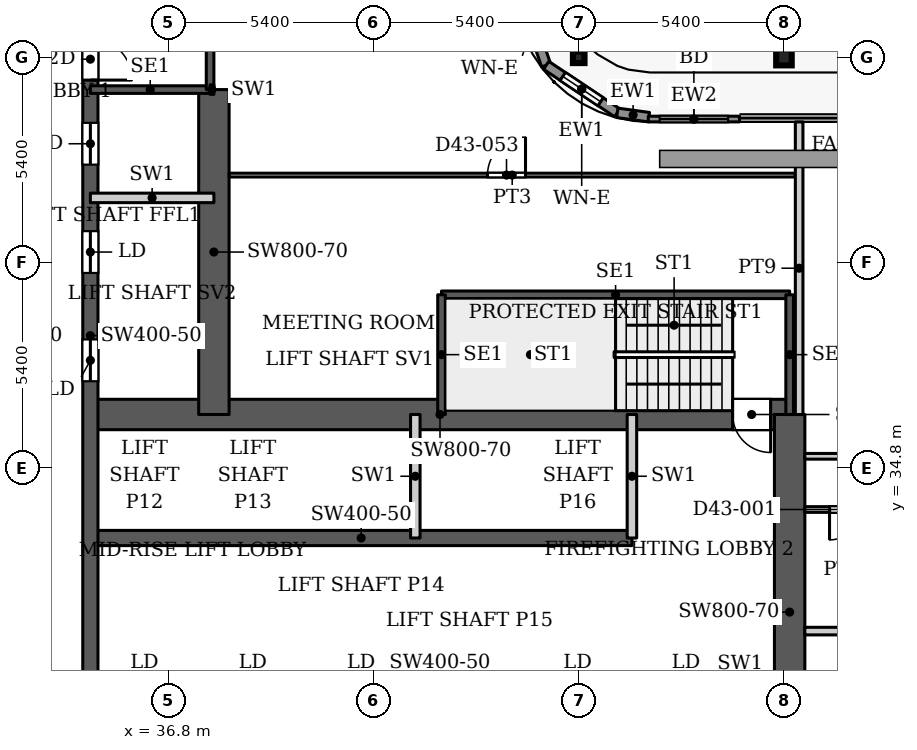
"""IFC4 building model, lengths in metres.
Left out: names, types, materials, properties, quantities, classifications, styles, units other than length and angle.
Written with IfcOpenShell. Run it as: python <this file> out.ifc"""

import sys

from ifc_helpers import new_model, si_unit, direction, frame, frame_2d, origin, origin_2d, place, context, subcontext, project, spatial, rectangle, hollow_rectangle, i_section, extrude, source, transform, mapped, element, fill, save


model = new_model("IFC4")
c1 = context("Model", 3, precision=1e-05, world=origin(), true_north=direction((0.0, 1.0)))
c2 = subcontext(c1, "Body", "Model", "MODEL_VIEW")
j1 = project(units=[si_unit("LENGTHUNIT", "METRE"), si_unit("PLANEANGLEUNIT", "RADIAN")], contexts=[c1])
p1 = place(None, origin())
s1 = spatial("IfcSite", under=j1, at=p1, CompositionType="ELEMENT")
p2 = place(p1, origin())
s2 = spatial("IfcBuilding", under=s1, at=p2, CompositionType="ELEMENT")
p3 = place(p2, frame((0.0, 0.0, 183.8)))
s3 = spatial("IfcBuildingStorey", under=s2, at=p3, CompositionType="ELEMENT", Elevation=183.8)
p4 = place(p3, frame((53.0, 45.6, 0.0), z_axis=(0.0, 0.0, 1.0), x_axis=(1.0, 0.0, 0.0)))
e1 = element("IfcColumn", 1, at=p4, inside=s3, PredefinedType="COLUMN", context=c2, shape_type="SweptSolid", body=[
    extrude(i_section(OverallWidth=0.409, OverallDepth=0.425, WebThickness=0.033, FlangeThickness=0.052, FilletRadius=0.013, at=origin_2d()), origin(), (0.0, 0.0, 1.0), 3.9),
])
p5 = place(p3, frame((47.6, 45.6, 0.0), z_axis=(0.0, 0.0, 1.0), x_axis=(1.0, 0.0, 0.0)))
e2 = element("IfcColumn", 2, at=p5, inside=s3, PredefinedType="COLUMN", context=c2, shape_type="SweptSolid", body=[
    extrude(hollow_rectangle(XDim=0.305, YDim=0.305, WallThickness=0.016, InnerFilletRadius=0.016, OuterFilletRadius=0.032, at=origin_2d()), origin(), (0.0, 0.0, 1.0), 3.9),
])
p6 = place(p3, frame((34.75, 32.95, 0.0), z_axis=(0.0, 0.0, 1.0), x_axis=(1.0, 0.0, 0.0)))
e3 = element("IfcWall", 3, at=p6, inside=s3, PredefinedType="SHEAR", context=c2, shape_type="SweptSolid", body=[
    extrude(rectangle(XDim=14.25, YDim=0.4, at=frame_2d((7.125, 0.0))), origin(), (0.0, 0.0, 1.0), 3.9),
])
p7 = place(p3, frame((34.75, 36.2, 0.0), z_axis=(0.0, 0.0, 1.0), x_axis=(1.0, 0.0, 0.0)))
e4 = element("IfcWall", 4, at=p7, inside=s3, PredefinedType="SHEAR", context=c2, shape_type="SweptSolid", body=[
    extrude(rectangle(XDim=18.4, YDim=0.8, at=frame_2d((9.2, 0.0))), origin(), (0.0, 0.0, 1.0), 3.9),
])
p8 = place(p7, frame((16.9, 0.0, 0.0)))
e5 = element("IfcOpeningElement", 5, at=p8, cuts=e4, PredefinedType="OPENING", context=c2, shape_type="SweptSolid", body=[
    extrude(rectangle(XDim=1.0, YDim=2.2, at=frame_2d((0.5, 1.1))), frame((0.0, 0.41, 0.0), z_axis=(0.0, -1.0, 0.0), x_axis=(1.0, 0.0, 0.0)), (0.0, 0.0, 1.0), 0.82),
])
p9 = place(p3, frame((34.75, 29.05, 0.0), z_axis=(0.0, 0.0, 1.0), x_axis=(0.0, 1.0, 0.0)))
e6 = element("IfcWall", 6, at=p9, inside=s3, PredefinedType="SHEAR", context=c2, shape_type="SweptSolid", body=[
    extrude(rectangle(XDim=18.45, YDim=0.4, at=frame_2d((9.225, 0.0))), origin(), (0.0, 0.0, 1.0), 3.9),
])
p10 = place(p9, frame((8.025, 0.0, 0.0)))
e7 = element("IfcOpeningElement", 7, at=p10, cuts=e6, PredefinedType="OPENING", context=c2, shape_type="SweptSolid", body=[
    extrude(rectangle(XDim=1.1, YDim=2.2, at=frame_2d((0.55, 1.1))), frame((0.0, 0.21, 0.0), z_axis=(0.0, -1.0, 0.0), x_axis=(1.0, 0.0, 0.0)), (0.0, 0.0, 1.0), 0.42),
])
p11 = place(p9, frame((10.875, 0.0, 0.0)))
e8 = element("IfcOpeningElement", 8, at=p11, cuts=e6, PredefinedType="OPENING", context=c2, shape_type="SweptSolid", body=[
    extrude(rectangle(XDim=1.1, YDim=2.2, at=frame_2d((0.55, 1.1))), frame((0.0, 0.21, 0.0), z_axis=(0.0, -1.0, 0.0), x_axis=(1.0, 0.0, 0.0)), (0.0, 0.0, 1.0), 0.42),
])
p12 = place(p9, frame((13.725, 0.0, 0.0)))
e9 = element("IfcOpeningElement", 9, at=p12, cuts=e6, PredefinedType="OPENING", context=c2, shape_type="SweptSolid", body=[
    extrude(rectangle(XDim=1.1, YDim=2.2, at=frame_2d((0.55, 1.1))), frame((0.0, 0.21, 0.0), z_axis=(0.0, -1.0, 0.0), x_axis=(1.0, 0.0, 0.0)), (0.0, 0.0, 1.0), 0.42),
])
p13 = place(p9, frame((15.95, 0.0, 0.0)))
e10 = element("IfcOpeningElement", 10, at=p13, cuts=e6, PredefinedType="OPENING", context=c2, shape_type="SweptSolid", body=[
    extrude(rectangle(XDim=1.1, YDim=2.2, at=frame_2d((0.55, 1.1))), frame((0.0, 0.21, 0.0), z_axis=(0.0, -1.0, 0.0), x_axis=(1.0, 0.0, 0.0)), (0.0, 0.0, 1.0), 0.42),
])
p14 = place(p3, frame((38.0, 36.2, 0.0), z_axis=(0.0, 0.0, 1.0), x_axis=(0.0, 1.0, 0.0)))
e11 = element("IfcWall", 11, at=p14, inside=s3, PredefinedType="SHEAR", context=c2, shape_type="SweptSolid", body=[
    extrude(rectangle(XDim=8.55, YDim=0.8, at=frame_2d((4.275, 0.0))), origin(), (0.0, 0.0, 1.0), 3.9),
])
p15 = place(p3, frame((53.15, 25.8, 0.0), z_axis=(0.0, 0.0, 1.0), x_axis=(0.0, 1.0, 0.0)))
e12 = element("IfcWall", 12, at=p15, inside=s3, PredefinedType="SHEAR", context=c2, shape_type="SweptSolid", body=[
    extrude(rectangle(XDim=10.4, YDim=0.8, at=frame_2d((5.2, 0.0))), origin(), (0.0, 0.0, 1.0), 3.9),
])
p16 = place(p3, frame((46.018, 47.471, 0.0), z_axis=(0.0, 0.0, 1.0), x_axis=(0.328791208903, -0.944402637093, 0.0)))
e13 = element("IfcWall", 13, at=p16, inside=s3, PredefinedType="SOLIDWALL", context=c2, shape_type="SweptSolid", body=[
    extrude(rectangle(XDim=2.205, YDim=0.25, at=frame_2d((1.102, 0.0))), origin(), (0.0, 0.0, 1.0), 3.75),
])
p17 = place(p16, frame((0.503, 0.0, 0.6)))
e14 = element("IfcOpeningElement", 14, at=p17, cuts=e13, PredefinedType="OPENING", context=c2, shape_type="SweptSolid", body=[
    extrude(rectangle(XDim=1.2, YDim=2.1, at=frame_2d((0.6, 1.05))), frame((0.0, 0.135, 0.0), z_axis=(0.0, -1.0, 0.0), x_axis=(1.0, 0.0, 0.0)), (0.0, 0.0, 1.0), 0.27),
])
p18 = place(p3, frame((46.743, 45.389, 0.0), z_axis=(0.0, 0.0, 1.0), x_axis=(0.831449265529, -0.555600682912, 0.0)))
e15 = element("IfcWall", 15, at=p18, inside=s3, PredefinedType="SOLIDWALL", context=c2, shape_type="SweptSolid", body=[
    extrude(rectangle(XDim=2.251, YDim=0.25, at=frame_2d((1.126, 0.0))), origin(), (0.0, 0.0, 1.0), 3.75),
])
p19 = place(p18, frame((0.525, 0.0, 0.6)))
e16 = element("IfcOpeningElement", 16, at=p19, cuts=e15, PredefinedType="OPENING", context=c2, shape_type="SweptSolid", body=[
    extrude(rectangle(XDim=1.2, YDim=2.1, at=frame_2d((0.6, 1.05))), frame((0.0, 0.135, 0.0), z_axis=(0.0, -1.0, 0.0), x_axis=(1.0, 0.0, 0.0)), (0.0, 0.0, 1.0), 0.27),
])
p20 = place(p3, frame((48.615, 44.138, 0.0), z_axis=(0.0, 0.0, 1.0), x_axis=(0.990741504246, -0.135761819977, 0.0)))
e17 = element("IfcWall", 17, at=p20, inside=s3, PredefinedType="SOLIDWALL", context=c2, shape_type="SweptSolid", body=[
    extrude(rectangle(XDim=0.84, YDim=0.25, at=frame_2d((0.42, 0.0))), origin(), (0.0, 0.0, 1.0), 3.75),
])
p21 = place(p3, frame((49.43, 43.975, 0.0), z_axis=(0.0, 0.0, 1.0), x_axis=(1.0, 0.0, 0.0)))
e18 = element("IfcWall", 18, at=p21, inside=s3, PredefinedType="SOLIDWALL", context=c2, shape_type="SweptSolid", body=[
    extrude(rectangle(XDim=2.4, YDim=0.15, at=frame_2d((1.2, 0.0))), origin(), (0.0, 0.0, 1.0), 3.75),
])
p22 = place(p21, frame((0.3, 0.0, 0.0)))
e19 = element("IfcOpeningElement", 19, at=p22, cuts=e18, PredefinedType="OPENING", context=c2, shape_type="SweptSolid", body=[
    extrude(rectangle(XDim=1.8, YDim=2.4, at=frame_2d((0.9, 1.2))), frame((0.0, 0.085, 0.0), z_axis=(0.0, -1.0, 0.0), x_axis=(1.0, 0.0, 0.0)), (0.0, 0.0, 1.0), 0.17),
])
p23 = place(p3, frame((43.99, 39.35, 0.0), z_axis=(0.0, 0.0, 1.0), x_axis=(1.0, 0.0, 0.0)))
e20 = element("IfcWall", 20, at=p23, inside=s3, PredefinedType="SHEAR", context=c2, shape_type="SweptSolid", body=[
    extrude(rectangle(XDim=9.16, YDim=0.2, at=frame_2d((4.58, 0.0))), origin(), (0.0, 0.0, 1.0), 3.9),
])
for number, where, z_axis, x_axis in (
    (21, (43.99, 36.2, 0.0), (0.0, 0.0, 1.0), (0.0, 1.0, 0.0)),
    (22, (53.15, 36.2, 0.0), (0.0, 0.0, 1.0), (0.0, 1.0, 0.0)),
):
    element("IfcWall", number, at=place(p3, frame(where, z_axis=z_axis, x_axis=x_axis)), inside=s3, PredefinedType="SHEAR", context=c2, shape_type="SweptSolid", body=[
        extrude(rectangle(XDim=3.15, YDim=0.2, at=frame_2d((1.575, 0.0))), origin(), (0.0, 0.0, 1.0), 3.9),
    ])
p24 = place(p3, frame((34.75, 44.75, 0.0), z_axis=(0.0, 0.0, 1.0), x_axis=(1.0, 0.0, 0.0)))
e23 = element("IfcWall", 23, at=p24, inside=s3, PredefinedType="SHEAR", context=c2, shape_type="SweptSolid", body=[
    extrude(rectangle(XDim=3.15, YDim=0.2, at=frame_2d((1.575, 0.0))), origin(), (0.0, 0.0, 1.0), 3.9),
])
p25 = place(p3, frame((37.9, 44.75, 0.0), z_axis=(0.0, 0.0, 1.0), x_axis=(0.0, 1.0, 0.0)))
e24 = element("IfcWall", 24, at=p25, inside=s3, PredefinedType="SHEAR", context=c2, shape_type="SweptSolid", body=[
    extrude(rectangle(XDim=9.16, YDim=0.2, at=frame_2d((4.58, 0.0))), origin(), (0.0, 0.0, 1.0), 3.9),
])
for number, where, z_axis, x_axis in (
    (25, (43.3, 32.95, 0.0), (0.0, 0.0, 1.0), (0.0, 1.0, 0.0)),
    (26, (49.0, 32.95, 0.0), (0.0, 0.0, 1.0), (0.0, 1.0, 0.0)),
    (27, (34.75, 41.9, 0.0), (0.0, 0.0, 1.0), (1.0, 0.0, 0.0)),
):
    element("IfcWall", number, at=place(p3, frame(where, z_axis=z_axis, x_axis=x_axis)), inside=s3, PredefinedType="PARTITIONING", context=c2, shape_type="SweptSolid", body=[
        extrude(rectangle(XDim=3.25, YDim=0.25, at=frame_2d((1.625, 0.0))), origin(), (0.0, 0.0, 1.0), 3.9),
    ])
p26 = place(p3, frame((37.9, 44.75, 0.0), z_axis=(0.0, 0.0, 1.0), x_axis=(1.0, 0.0, 0.0)))
e28 = element("IfcWall", 28, at=p26, inside=s3, PredefinedType="PARTITIONING", context=c2, shape_type="SweptSolid", body=[
    extrude(rectangle(XDim=0.1, YDim=0.25, at=frame_2d((0.05, 0.0))), origin(), (0.0, 0.0, 1.0), 3.9),
])
p27 = place(p3, frame((38.399, 42.5, 0.0), z_axis=(0.0, 0.0, 1.0), x_axis=(1.0, 0.0, 0.0)))
e29 = element("IfcWall", 29, at=p27, inside=s3, PredefinedType="PARTITIONING", context=c2, shape_type="SweptSolid", body=[
    extrude(rectangle(XDim=14.901, YDim=0.1, at=frame_2d((7.451, 0.0))), origin(), (0.0, 0.0, 1.0), 3.6),
])
p28 = place(p27, frame((6.801, 0.0, 0.0)))
e30 = element("IfcOpeningElement", 30, at=p28, cuts=e29, PredefinedType="OPENING", context=c2, shape_type="SweptSolid", body=[
    extrude(rectangle(XDim=1.0, YDim=2.1, at=frame_2d((0.5, 1.05))), frame((0.0, 0.06, 0.0), z_axis=(0.0, -1.0, 0.0), x_axis=(1.0, 0.0, 0.0)), (0.0, 0.0, 1.0), 0.12),
])
p29 = place(p3, frame((53.4, 36.199, 0.0), z_axis=(0.0, 0.0, 1.0), x_axis=(0.0, 1.0, 0.0)))
e31 = element("IfcWall", 31, at=p29, inside=s3, PredefinedType="PARTITIONING", context=c2, shape_type="SweptSolid", body=[
    extrude(rectangle(XDim=7.701, YDim=0.2, at=frame_2d((3.851, 0.0))), origin(), (0.0, 0.0, 1.0), 3.6),
])
p30 = place(p3, frame((53.549, 30.5, 0.0), z_axis=(0.0, 0.0, 1.0), x_axis=(1.0, 0.0, 0.0)))
e32 = element("IfcWall", 32, at=p30, inside=s3, PredefinedType="PARTITIONING", context=c2, shape_type="SweptSolid", body=[
    extrude(rectangle(XDim=44.551, YDim=0.2, at=frame_2d((22.275, 0.0))), origin(), (0.0, 0.0, 1.0), 3.6),
])
p31 = place(p30, frame((8.351, 0.0, 0.0)))
e33 = element("IfcOpeningElement", 33, at=p31, cuts=e32, PredefinedType="OPENING", context=c2, shape_type="SweptSolid", body=[
    extrude(rectangle(XDim=1.0, YDim=2.1, at=frame_2d((0.5, 1.05))), frame((0.0, 0.11, 0.0), z_axis=(0.0, -1.0, 0.0), x_axis=(1.0, 0.0, 0.0)), (0.0, 0.0, 1.0), 0.22),
])
p32 = place(p30, frame((12.551, 0.0, 0.0)))
e34 = element("IfcOpeningElement", 34, at=p32, cuts=e32, PredefinedType="OPENING", context=c2, shape_type="SweptSolid", body=[
    extrude(rectangle(XDim=1.0, YDim=2.1, at=frame_2d((0.5, 1.05))), frame((0.0, 0.11, 0.0), z_axis=(0.0, -1.0, 0.0), x_axis=(1.0, 0.0, 0.0)), (0.0, 0.0, 1.0), 0.22),
])
p33 = place(p30, frame((28.751, 0.0, 0.0)))
e35 = element("IfcOpeningElement", 35, at=p33, cuts=e32, PredefinedType="OPENING", context=c2, shape_type="SweptSolid", body=[
    extrude(rectangle(XDim=1.0, YDim=2.1, at=frame_2d((0.5, 1.05))), frame((0.0, 0.11, 0.0), z_axis=(0.0, -1.0, 0.0), x_axis=(1.0, 0.0, 0.0)), (0.0, 0.0, 1.0), 0.22),
])
p34 = place(p30, frame((40.751, 0.0, 0.0)))
e36 = element("IfcOpeningElement", 36, at=p34, cuts=e32, PredefinedType="OPENING", context=c2, shape_type="SweptSolid", body=[
    extrude(rectangle(XDim=1.0, YDim=2.1, at=frame_2d((0.5, 1.05))), frame((0.0, 0.11, 0.0), z_axis=(0.0, -1.0, 0.0), x_axis=(1.0, 0.0, 0.0)), (0.0, 0.0, 1.0), 0.22),
])
p35 = place(p3, frame((53.549, 33.7, 0.0), z_axis=(0.0, 0.0, 1.0), x_axis=(1.0, 0.0, 0.0)))
e37 = element("IfcWall", 37, at=p35, inside=s3, PredefinedType="PARTITIONING", context=c2, shape_type="SweptSolid", body=[
    extrude(rectangle(XDim=7.701, YDim=0.15, at=frame_2d((3.851, 0.0))), origin(), (0.0, 0.0, 1.0), 3.6),
])
p36 = place(p35, frame((0.651, 0.0, 0.0)))
e38 = element("IfcOpeningElement", 38, at=p36, cuts=e37, PredefinedType="OPENING", context=c2, shape_type="SweptSolid", body=[
    extrude(rectangle(XDim=0.8, YDim=2.1, at=frame_2d((0.4, 1.05))), frame((0.0, 0.085, 0.0), z_axis=(0.0, -1.0, 0.0), x_axis=(1.0, 0.0, 0.0)), (0.0, 0.0, 1.0), 0.17),
])
p37 = place(p35, frame((5.401, 0.0, 0.0)))
e39 = element("IfcOpeningElement", 39, at=p37, cuts=e37, PredefinedType="OPENING", context=c2, shape_type="SweptSolid", body=[
    extrude(rectangle(XDim=0.9, YDim=2.1, at=frame_2d((0.45, 1.05))), frame((0.0, 0.085, 0.0), z_axis=(0.0, -1.0, 0.0), x_axis=(1.0, 0.0, 0.0)), (0.0, 0.0, 1.0), 0.17),
])
p38 = place(p35, frame((2.751, 0.0, 0.0)))
e40 = element("IfcOpeningElement", 40, at=p38, cuts=e37, PredefinedType="OPENING", context=c2, shape_type="SweptSolid", body=[
    extrude(rectangle(XDim=0.8, YDim=2.1, at=frame_2d((0.4, 1.05))), frame((0.0, 0.085, 0.0), z_axis=(0.0, -1.0, 0.0), x_axis=(1.0, 0.0, 0.0)), (0.0, 0.0, 1.0), 0.17),
])
p39 = place(p3, frame((53.549, 35.1, 0.0), z_axis=(0.0, 0.0, 1.0), x_axis=(1.0, 0.0, 0.0)))
e41 = element("IfcWall", 41, at=p39, inside=s3, PredefinedType="PARTITIONING", context=c2, shape_type="SweptSolid", body=[
    extrude(rectangle(XDim=11.751, YDim=0.15, at=frame_2d((5.875, 0.0))), origin(), (0.0, 0.0, 1.0), 3.6),
])
p40 = place(p39, frame((5.551, 0.0, 0.0)))
e42 = element("IfcOpeningElement", 42, at=p40, cuts=e41, PredefinedType="OPENING", context=c2, shape_type="SweptSolid", body=[
    extrude(rectangle(XDim=0.9, YDim=2.1, at=frame_2d((0.45, 1.05))), frame((0.0, 0.085, 0.0), z_axis=(0.0, -1.0, 0.0), x_axis=(1.0, 0.0, 0.0)), (0.0, 0.0, 1.0), 0.17),
])
p41 = place(p39, frame((1.751, 0.0, 0.0)))
e43 = element("IfcOpeningElement", 43, at=p41, cuts=e41, PredefinedType="OPENING", context=c2, shape_type="SweptSolid", body=[
    extrude(rectangle(XDim=1.0, YDim=2.1, at=frame_2d((0.5, 1.05))), frame((0.0, 0.085, 0.0), z_axis=(0.0, -1.0, 0.0), x_axis=(1.0, 0.0, 0.0)), (0.0, 0.0, 1.0), 0.17),
])
p42 = place(p39, frame((8.101, 0.0, 0.0)))
e44 = element("IfcOpeningElement", 44, at=p42, cuts=e41, PredefinedType="OPENING", context=c2, shape_type="SweptSolid", body=[
    extrude(rectangle(XDim=0.9, YDim=2.1, at=frame_2d((0.45, 1.05))), frame((0.0, 0.085, 0.0), z_axis=(0.0, -1.0, 0.0), x_axis=(1.0, 0.0, 0.0)), (0.0, 0.0, 1.0), 0.17),
])
m1 = source(origin(), c2, "Body", "SweptSolid", [
    extrude(rectangle(XDim=1.2, YDim=2.1, at=frame_2d((0.6, 1.05))), frame((0.0, 0.03, 0.0), z_axis=(0.0, -1.0, 0.0), x_axis=(1.0, 0.0, 0.0)), (0.0, 0.0, 1.0), 0.06),
])
p43 = place(p19, origin())
e45 = element("IfcWindow", 45, at=p43, inside=s3, PartitioningType="SINGLE_PANEL", PredefinedType="WINDOW", context=c2, shape_type="MappedRepresentation", body=[
    mapped(m1, transform((0.0, 0.0, 0.0), x_axis=(1.0, 0.0, 0.0), y_axis=(0.0, 1.0, 0.0), z_axis=(0.0, 0.0, 1.0), scale=1.0)),
])
fill(e16, e45)
m2 = source(origin(), c2, "Body", "SweptSolid", [
    extrude(rectangle(XDim=1.8, YDim=2.4, at=frame_2d((0.9, 1.2))), frame((0.0, 0.025, 0.0), z_axis=(0.0, -1.0, 0.0), x_axis=(1.0, 0.0, 0.0)), (0.0, 0.0, 1.0), 0.05),
])
p44 = place(p22, origin())
e46 = element("IfcDoor", 46, at=p44, inside=s3, OperationType="SLIDING_TO_LEFT", PredefinedType="DOOR", context=c2, shape_type="MappedRepresentation", body=[
    mapped(m2, transform((0.0, 0.0, 0.0), x_axis=(1.0, 0.0, 0.0), y_axis=(0.0, 1.0, 0.0), z_axis=(0.0, 0.0, 1.0), scale=1.0)),
])
fill(e19, e46)
m3 = source(origin(), c2, "Body", "SweptSolid", [
    extrude(rectangle(XDim=1.1, YDim=2.2, at=frame_2d((0.55, 1.1))), frame((0.0, 0.025, 0.0), z_axis=(0.0, -1.0, 0.0), x_axis=(1.0, 0.0, 0.0)), (0.0, 0.0, 1.0), 0.05),
])
p45 = place(p10, origin())
e47 = element("IfcDoor", 47, at=p45, inside=s3, OperationType="SLIDING_TO_LEFT", PredefinedType="DOOR", context=c2, shape_type="MappedRepresentation", body=[
    mapped(m3, transform((0.0, 0.0, 0.0), x_axis=(1.0, 0.0, 0.0), y_axis=(0.0, 1.0, 0.0), z_axis=(0.0, 0.0, 1.0), scale=1.0)),
])
fill(e7, e47)
p46 = place(p11, origin())
e48 = element("IfcDoor", 48, at=p46, inside=s3, OperationType="SLIDING_TO_LEFT", PredefinedType="DOOR", context=c2, shape_type="MappedRepresentation", body=[
    mapped(m3, transform((0.0, 0.0, 0.0), x_axis=(1.0, 0.0, 0.0), y_axis=(0.0, 1.0, 0.0), z_axis=(0.0, 0.0, 1.0), scale=1.0)),
])
fill(e8, e48)
p47 = place(p12, origin())
e49 = element("IfcDoor", 49, at=p47, inside=s3, OperationType="SLIDING_TO_LEFT", PredefinedType="DOOR", context=c2, shape_type="MappedRepresentation", body=[
    mapped(m3, transform((0.0, 0.0, 0.0), x_axis=(1.0, 0.0, 0.0), y_axis=(0.0, 1.0, 0.0), z_axis=(0.0, 0.0, 1.0), scale=1.0)),
])
fill(e9, e49)
m4 = source(origin(), c2, "Body", "SweptSolid", [
    extrude(rectangle(XDim=1.0, YDim=2.2, at=frame_2d((0.5, 1.1))), frame((0.0, 0.025, 0.0), z_axis=(0.0, -1.0, 0.0), x_axis=(1.0, 0.0, 0.0)), (0.0, 0.0, 1.0), 0.05),
])
p48 = place(p8, origin())
e50 = element("IfcDoor", 50, at=p48, inside=s3, OperationType="SINGLE_SWING_RIGHT", PredefinedType="DOOR", context=c2, shape_type="MappedRepresentation", body=[
    mapped(m4, transform((0.0, 0.0, 0.0), x_axis=(1.0, 0.0, 0.0), y_axis=(0.0, 1.0, 0.0), z_axis=(0.0, 0.0, 1.0), scale=1.0)),
])
fill(e5, e50)
m5 = source(origin(), c2, "Body", "SweptSolid", [
    extrude(rectangle(XDim=1.1, YDim=2.2, at=frame_2d((0.55, 1.1))), frame((0.0, 0.025, 0.0), z_axis=(0.0, -1.0, 0.0), x_axis=(1.0, 0.0, 0.0)), (0.0, 0.0, 1.0), 0.05),
])
p49 = place(p13, origin())
e51 = element("IfcDoor", 51, at=p49, inside=s3, OperationType="SINGLE_SWING_RIGHT", PredefinedType="DOOR", context=c2, shape_type="MappedRepresentation", body=[
    mapped(m5, transform((0.0, 0.0, 0.0), x_axis=(1.0, 0.0, 0.0), y_axis=(0.0, 1.0, 0.0), z_axis=(0.0, 0.0, 1.0), scale=1.0)),
])
fill(e10, e51)
m6 = source(origin(), c2, "Body", "SweptSolid", [
    extrude(rectangle(XDim=0.8, YDim=2.1, at=frame_2d((0.4, 1.05))), frame((0.0, 0.025, 0.0), z_axis=(0.0, -1.0, 0.0), x_axis=(1.0, 0.0, 0.0)), (0.0, 0.0, 1.0), 0.05),
])
p50 = place(p36, origin())
e52 = element("IfcDoor", 52, at=p50, inside=s3, OperationType="SINGLE_SWING_RIGHT", PredefinedType="DOOR", context=c2, shape_type="MappedRepresentation", body=[
    mapped(m6, transform((0.0, 0.0, 0.0), x_axis=(1.0, 0.0, 0.0), y_axis=(0.0, 1.0, 0.0), z_axis=(0.0, 0.0, 1.0), scale=1.0)),
])
fill(e38, e52)
m7 = source(origin(), c2, "Body", "SweptSolid", [
    extrude(rectangle(XDim=1.0, YDim=2.1, at=frame_2d((0.5, 1.05))), frame((0.0, 0.025, 0.0), z_axis=(0.0, -1.0, 0.0), x_axis=(1.0, 0.0, 0.0)), (0.0, 0.0, 1.0), 0.05),
])
p51 = place(p28, origin())
e53 = element("IfcDoor", 53, at=p51, inside=s3, OperationType="SINGLE_SWING_LEFT", PredefinedType="DOOR", context=c2, shape_type="MappedRepresentation", body=[
    mapped(m7, transform((0.0, 0.0, 0.0), x_axis=(1.0, 0.0, 0.0), y_axis=(0.0, 1.0, 0.0), z_axis=(0.0, 0.0, 1.0), scale=1.0)),
])
fill(e30, e53)
save(model, sys.argv[1])
